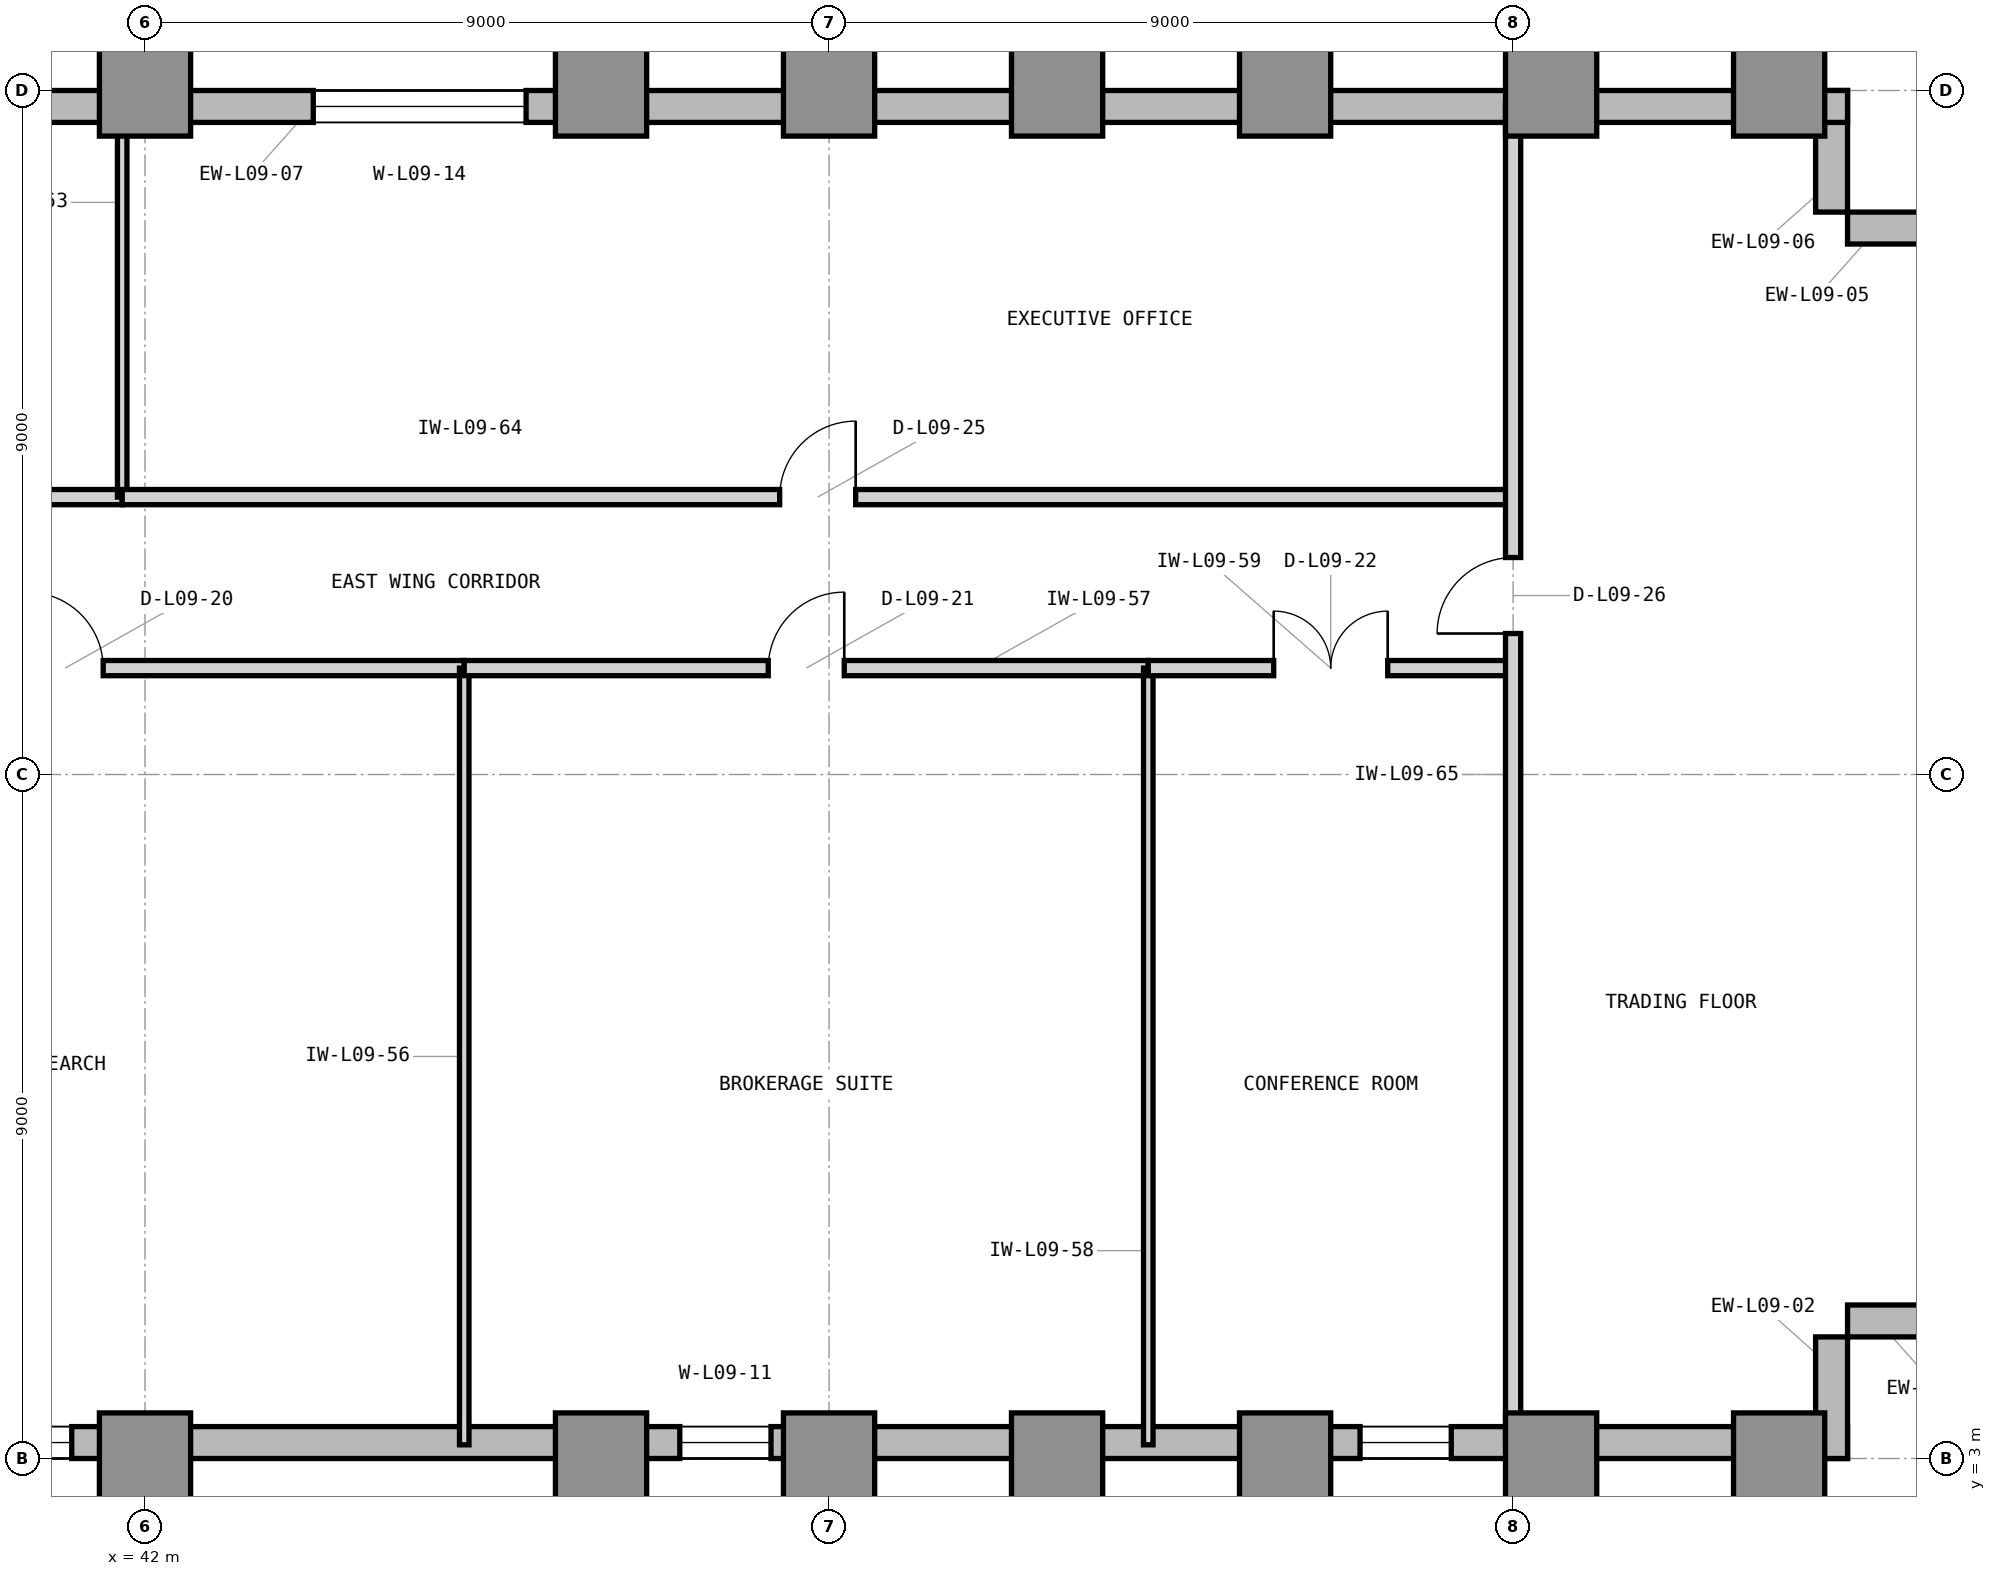
"""IFC4 building model, lengths in metres.
Left out: names, types, materials, properties, quantities, classifications, styles, units other than length and angle.
Written with IfcOpenShell. Run it as: python <this file> out.ifc"""

import sys

from ifc_helpers import new_model, si_unit, direction, frame, frame_2d, origin, origin_2d, place, context, subcontext, project, spatial, rectangle, extrude, element, fill, save


model = new_model("IFC4")
c1 = context("Model", 3, precision=1e-05, world=origin(), true_north=direction((0.0, 1.0)))
c2 = subcontext(c1, "Body", "Model", "MODEL_VIEW")
j1 = project(units=[si_unit("LENGTHUNIT", "METRE"), si_unit("PLANEANGLEUNIT", "RADIAN")], contexts=[c1])
p1 = place(None, origin())
s1 = spatial("IfcSite", under=j1, at=p1, CompositionType="ELEMENT")
p2 = place(p1, origin())
s2 = spatial("IfcBuilding", under=s1, at=p2, CompositionType="ELEMENT")
p3 = place(p2, frame((0.0, 0.0, 42.6)))
s3 = spatial("IfcBuildingStorey", under=s2, at=p3, CompositionType="ELEMENT", Elevation=42.6)
for number, where, z_axis, x_axis in (
    (1, (42.0, 3.0, 0.0), (0.0, 0.0, 1.0), (1.0, 0.0, 0.0)),
    (2, (42.0, 21.0, 0.0), (0.0, 0.0, 1.0), (1.0, 0.0, 0.0)),
    (3, (48.0, 3.0, 0.0), (0.0, 0.0, 1.0), (1.0, 0.0, 0.0)),
    (4, (48.0, 21.0, 0.0), (0.0, 0.0, 1.0), (1.0, 0.0, 0.0)),
    (5, (51.0, 3.0, 0.0), (0.0, 0.0, 1.0), (1.0, 0.0, 0.0)),
    (6, (51.0, 21.0, 0.0), (0.0, 0.0, 1.0), (1.0, 0.0, 0.0)),
    (7, (54.0, 3.0, 0.0), (0.0, 0.0, 1.0), (1.0, 0.0, 0.0)),
    (8, (54.0, 21.0, 0.0), (0.0, 0.0, 1.0), (1.0, 0.0, 0.0)),
    (9, (57.0, 3.0, 0.0), (0.0, 0.0, 1.0), (1.0, 0.0, 0.0)),
    (10, (57.0, 21.0, 0.0), (0.0, 0.0, 1.0), (1.0, 0.0, 0.0)),
    (11, (60.5, 3.0, 0.0), (0.0, 0.0, 1.0), (1.0, 0.0, 0.0)),
    (12, (60.5, 21.0, 0.0), (0.0, 0.0, 1.0), (1.0, 0.0, 0.0)),
    (13, (63.5, 3.0, 0.0), (0.0, 0.0, 1.0), (1.0, 0.0, 0.0)),
    (14, (63.5, 21.0, 0.0), (0.0, 0.0, 1.0), (1.0, 0.0, 0.0)),
):
    element("IfcColumn", number, at=place(p3, frame(where, z_axis=z_axis, x_axis=x_axis)), inside=s3, PredefinedType="COLUMN", context=c2, shape_type="SweptSolid", body=[
        extrude(rectangle(XDim=1.2, YDim=1.2, at=origin_2d()), origin(), (0.0, 0.0, 1.0), 4.2),
    ])
p4 = place(p3, frame((23.9, 3.21, 0.0), z_axis=(0.0, 0.0, 1.0), x_axis=(1.0, 0.0, 0.0)))
e15 = element("IfcWall", 15, at=p4, inside=s3, PredefinedType="STANDARD", context=c2, shape_type="SweptSolid", body=[
    extrude(rectangle(XDim=40.5, YDim=0.42, at=frame_2d((20.25, 0.0))), origin(), (0.0, 0.0, 1.0), 3.98),
])
p5 = place(p4, frame((1.1, 0.0, 0.85)))
e16 = element("IfcOpeningElement", 16, at=p5, cuts=e15, PredefinedType="OPENING", context=c2, shape_type="SweptSolid", body=[
    extrude(rectangle(XDim=1.2, YDim=2.45, at=frame_2d((0.6, 1.225))), frame((0.0, 0.22, 0.0), z_axis=(0.0, -1.0, 0.0), x_axis=(1.0, 0.0, 0.0)), (0.0, 0.0, 1.0), 0.44),
])
p6 = place(p4, frame((5.336, 0.0, 0.85)))
e17 = element("IfcOpeningElement", 17, at=p6, cuts=e15, PredefinedType="OPENING", context=c2, shape_type="SweptSolid", body=[
    extrude(rectangle(XDim=2.8, YDim=2.45, at=frame_2d((1.4, 1.225))), frame((0.0, 0.22, 0.0), z_axis=(0.0, -1.0, 0.0), x_axis=(1.0, 0.0, 0.0)), (0.0, 0.0, 1.0), 0.44),
])
p7 = place(p4, frame((14.336, 0.0, 0.85)))
e18 = element("IfcOpeningElement", 18, at=p7, cuts=e15, PredefinedType="OPENING", context=c2, shape_type="SweptSolid", body=[
    extrude(rectangle(XDim=2.8, YDim=2.45, at=frame_2d((1.4, 1.225))), frame((0.0, 0.22, 0.0), z_axis=(0.0, -1.0, 0.0), x_axis=(1.0, 0.0, 0.0)), (0.0, 0.0, 1.0), 0.44),
])
p8 = place(p4, frame((25.136, 0.0, 0.85)))
e19 = element("IfcOpeningElement", 19, at=p8, cuts=e15, PredefinedType="OPENING", context=c2, shape_type="SweptSolid", body=[
    extrude(rectangle(XDim=1.2, YDim=2.45, at=frame_2d((0.6, 1.225))), frame((0.0, 0.22, 0.0), z_axis=(0.0, -1.0, 0.0), x_axis=(1.0, 0.0, 0.0)), (0.0, 0.0, 1.0), 0.44),
])
p9 = place(p4, frame((34.086, 0.0, 0.85)))
e20 = element("IfcOpeningElement", 20, at=p9, cuts=e15, PredefinedType="OPENING", context=c2, shape_type="SweptSolid", body=[
    extrude(rectangle(XDim=1.2, YDim=2.45, at=frame_2d((0.6, 1.225))), frame((0.0, 0.22, 0.0), z_axis=(0.0, -1.0, 0.0), x_axis=(1.0, 0.0, 0.0)), (0.0, 0.0, 1.0), 0.44),
])
for number, where, z_axis, x_axis in (
    (21, (64.19, 3.0, 0.0), (0.0, 0.0, 1.0), (0.0, 1.0, 0.0)),
    (22, (64.4, 4.81, 0.0), (0.0, 0.0, 1.0), (1.0, 0.0, 0.0)),
    (23, (66.0, 19.19, 0.0), (0.0, 0.0, 1.0), (-1.0, 0.0, 0.0)),
    (24, (64.19, 19.4, 0.0), (0.0, 0.0, 1.0), (0.0, 1.0, 0.0)),
):
    element("IfcWall", number, at=place(p3, frame(where, z_axis=z_axis, x_axis=x_axis)), inside=s3, PredefinedType="STANDARD", context=c2, shape_type="SweptSolid", body=[
        extrude(rectangle(XDim=1.6, YDim=0.42, at=frame_2d((0.8, 0.0))), origin(), (0.0, 0.0, 1.0), 3.98),
    ])
p10 = place(p3, frame((64.4, 20.79, 0.0), z_axis=(0.0, 0.0, 1.0), x_axis=(-1.0, 0.0, 0.0)))
e25 = element("IfcWall", 25, at=p10, inside=s3, PredefinedType="STANDARD", context=c2, shape_type="SweptSolid", body=[
    extrude(rectangle(XDim=40.4, YDim=0.42, at=frame_2d((20.2, 0.0))), origin(), (0.0, 0.0, 1.0), 3.98),
])
p11 = place(p10, frame((26.375, 0.0, 0.85)))
e26 = element("IfcOpeningElement", 26, at=p11, cuts=e25, PredefinedType="OPENING", context=c2, shape_type="SweptSolid", body=[
    extrude(rectangle(XDim=2.8, YDim=2.45, at=frame_2d((1.4, 1.225))), frame((0.0, 0.22, 0.0), z_axis=(0.0, -1.0, 0.0), x_axis=(1.0, 0.0, 0.0)), (0.0, 0.0, 1.0), 0.44),
])
p12 = place(p10, frame((38.222, 0.0, 0.85)))
e27 = element("IfcOpeningElement", 27, at=p12, cuts=e25, PredefinedType="OPENING", context=c2, shape_type="SweptSolid", body=[
    extrude(rectangle(XDim=1.2, YDim=2.45, at=frame_2d((0.6, 1.225))), frame((0.0, 0.22, 0.0), z_axis=(0.0, -1.0, 0.0), x_axis=(1.0, 0.0, 0.0)), (0.0, 0.0, 1.0), 0.44),
])
p13 = place(p10, frame((32.536, 0.0, 0.85)))
e28 = element("IfcOpeningElement", 28, at=p13, cuts=e25, PredefinedType="OPENING", context=c2, shape_type="SweptSolid", body=[
    extrude(rectangle(XDim=2.8, YDim=2.45, at=frame_2d((1.4, 1.225))), frame((0.0, 0.22, 0.0), z_axis=(0.0, -1.0, 0.0), x_axis=(1.0, 0.0, 0.0)), (0.0, 0.0, 1.0), 0.44),
])
p14 = place(p10, frame((17.386, 0.0, 0.85)))
e29 = element("IfcOpeningElement", 29, at=p14, cuts=e25, PredefinedType="OPENING", context=c2, shape_type="SweptSolid", body=[
    extrude(rectangle(XDim=2.8, YDim=2.45, at=frame_2d((1.4, 1.225))), frame((0.0, 0.22, 0.0), z_axis=(0.0, -1.0, 0.0), x_axis=(1.0, 0.0, 0.0)), (0.0, 0.0, 1.0), 0.44),
])
p15 = place(p3, frame((35.7, 13.4, 0.0), z_axis=(0.0, 0.0, 1.0), x_axis=(1.0, 0.0, 0.0)))
e30 = element("IfcWall", 30, at=p15, inside=s3, PredefinedType="PARTITIONING", context=c2, shape_type="SweptSolid", body=[
    extrude(rectangle(XDim=10.5, YDim=0.2, at=frame_2d((5.25, 0.0))), origin(), (0.0, 0.0, 1.0), 3.97),
])
p16 = place(p15, frame((4.75, 0.0, 0.0)))
e31 = element("IfcOpeningElement", 31, at=p16, cuts=e30, PredefinedType="OPENING", context=c2, shape_type="SweptSolid", body=[
    extrude(rectangle(XDim=1.0, YDim=2.15, at=frame_2d((0.5, 1.075))), frame((0.0, 0.11, 0.0), z_axis=(0.0, -1.0, 0.0), x_axis=(1.0, 0.0, 0.0)), (0.0, 0.0, 1.0), 0.22),
])
p17 = place(p3, frame((46.2, 3.18, 0.0), z_axis=(0.0, 0.0, 1.0), x_axis=(0.0, 1.0, 0.0)))
e32 = element("IfcWall", 32, at=p17, inside=s3, PredefinedType="PARTITIONING", context=c2, shape_type="SweptSolid", body=[
    extrude(rectangle(XDim=10.22, YDim=0.125, at=frame_2d((5.11, 0.0))), origin(), (0.0, 0.0, 1.0), 3.97),
])
p18 = place(p3, frame((46.2, 13.4, 0.0), z_axis=(0.0, 0.0, 1.0), x_axis=(1.0, 0.0, 0.0)))
e33 = element("IfcWall", 33, at=p18, inside=s3, PredefinedType="PARTITIONING", context=c2, shape_type="SweptSolid", body=[
    extrude(rectangle(XDim=9.0, YDim=0.2, at=frame_2d((4.5, 0.0))), origin(), (0.0, 0.0, 1.0), 3.97),
])
p19 = place(p18, frame((4.0, 0.0, 0.0)))
e34 = element("IfcOpeningElement", 34, at=p19, cuts=e33, PredefinedType="OPENING", context=c2, shape_type="SweptSolid", body=[
    extrude(rectangle(XDim=1.0, YDim=2.15, at=frame_2d((0.5, 1.075))), frame((0.0, 0.11, 0.0), z_axis=(0.0, -1.0, 0.0), x_axis=(1.0, 0.0, 0.0)), (0.0, 0.0, 1.0), 0.22),
])
p20 = place(p3, frame((55.2, 3.18, 0.0), z_axis=(0.0, 0.0, 1.0), x_axis=(0.0, 1.0, 0.0)))
e35 = element("IfcWall", 35, at=p20, inside=s3, PredefinedType="PARTITIONING", context=c2, shape_type="SweptSolid", body=[
    extrude(rectangle(XDim=10.22, YDim=0.125, at=frame_2d((5.11, 0.0))), origin(), (0.0, 0.0, 1.0), 3.97),
])
p21 = place(p3, frame((55.2, 13.4, 0.0), z_axis=(0.0, 0.0, 1.0), x_axis=(1.0, 0.0, 0.0)))
e36 = element("IfcWall", 36, at=p21, inside=s3, PredefinedType="PARTITIONING", context=c2, shape_type="SweptSolid", body=[
    extrude(rectangle(XDim=4.8, YDim=0.2, at=frame_2d((2.4, 0.0))), origin(), (0.0, 0.0, 1.0), 3.97),
])
p22 = place(p21, frame((1.65, 0.0, 0.0)))
e37 = element("IfcOpeningElement", 37, at=p22, cuts=e36, PredefinedType="OPENING", context=c2, shape_type="SweptSolid", body=[
    extrude(rectangle(XDim=1.5, YDim=2.3, at=frame_2d((0.75, 1.15))), frame((0.0, 0.11, 0.0), z_axis=(0.0, -1.0, 0.0), x_axis=(1.0, 0.0, 0.0)), (0.0, 0.0, 1.0), 0.22),
])
p23 = place(p3, frame((34.2, 15.65, 0.0), z_axis=(0.0, 0.0, 1.0), x_axis=(1.0, 0.0, 0.0)))
e38 = element("IfcWall", 38, at=p23, inside=s3, PredefinedType="PARTITIONING", context=c2, shape_type="SweptSolid", body=[
    extrude(rectangle(XDim=7.5, YDim=0.2, at=frame_2d((3.75, 0.0))), origin(), (0.0, 0.0, 1.0), 3.97),
])
p24 = place(p23, frame((3.0, 0.0, 0.0)))
e39 = element("IfcOpeningElement", 39, at=p24, cuts=e38, PredefinedType="OPENING", context=c2, shape_type="SweptSolid", body=[
    extrude(rectangle(XDim=1.5, YDim=2.3, at=frame_2d((0.75, 1.15))), frame((0.0, 0.11, 0.0), z_axis=(0.0, -1.0, 0.0), x_axis=(1.0, 0.0, 0.0)), (0.0, 0.0, 1.0), 0.22),
])
p25 = place(p3, frame((41.7, 15.65, 0.0), z_axis=(0.0, 0.0, 1.0), x_axis=(0.0, 1.0, 0.0)))
e40 = element("IfcWall", 40, at=p25, inside=s3, PredefinedType="PARTITIONING", context=c2, shape_type="SweptSolid", body=[
    extrude(rectangle(XDim=5.17, YDim=0.125, at=frame_2d((2.585, 0.0))), origin(), (0.0, 0.0, 1.0), 3.97),
])
p26 = place(p3, frame((41.7, 15.65, 0.0), z_axis=(0.0, 0.0, 1.0), x_axis=(1.0, 0.0, 0.0)))
e41 = element("IfcWall", 41, at=p26, inside=s3, PredefinedType="PARTITIONING", context=c2, shape_type="SweptSolid", body=[
    extrude(rectangle(XDim=18.3, YDim=0.2, at=frame_2d((9.15, 0.0))), origin(), (0.0, 0.0, 1.0), 3.97),
])
p27 = place(p26, frame((8.65, 0.0, 0.0)))
e42 = element("IfcOpeningElement", 42, at=p27, cuts=e41, PredefinedType="OPENING", context=c2, shape_type="SweptSolid", body=[
    extrude(rectangle(XDim=1.0, YDim=2.15, at=frame_2d((0.5, 1.075))), frame((0.0, 0.11, 0.0), z_axis=(0.0, -1.0, 0.0), x_axis=(1.0, 0.0, 0.0)), (0.0, 0.0, 1.0), 0.22),
])
p28 = place(p3, frame((60.0, 3.18, 0.0), z_axis=(0.0, 0.0, 1.0), x_axis=(0.0, 1.0, 0.0)))
e43 = element("IfcWall", 43, at=p28, inside=s3, PredefinedType="PARTITIONING", context=c2, shape_type="SweptSolid", body=[
    extrude(rectangle(XDim=17.64, YDim=0.2, at=frame_2d((8.82, 0.0))), origin(), (0.0, 0.0, 1.0), 3.97),
])
p29 = place(p28, frame((10.675, 0.0, 0.0)))
e44 = element("IfcOpeningElement", 44, at=p29, cuts=e43, PredefinedType="OPENING", context=c2, shape_type="SweptSolid", body=[
    extrude(rectangle(XDim=1.0, YDim=2.15, at=frame_2d((0.5, 1.075))), frame((0.0, 0.11, 0.0), z_axis=(0.0, -1.0, 0.0), x_axis=(1.0, 0.0, 0.0)), (0.0, 0.0, 1.0), 0.22),
])
p30 = place(p16, origin())
e45 = element("IfcDoor", 45, at=p30, inside=s3, OperationType="SINGLE_SWING_LEFT", PredefinedType="DOOR", context=c2, shape_type="SweptSolid", body=[
    extrude(rectangle(XDim=1.0, YDim=2.15, at=frame_2d((0.5, 1.075))), frame((0.0, 0.025, 0.0), z_axis=(0.0, -1.0, 0.0), x_axis=(1.0, 0.0, 0.0)), (0.0, 0.0, 1.0), 0.05),
])
fill(e31, e45)
p31 = place(p19, origin())
e46 = element("IfcDoor", 46, at=p31, inside=s3, OperationType="SINGLE_SWING_RIGHT", PredefinedType="DOOR", context=c2, shape_type="SweptSolid", body=[
    extrude(rectangle(XDim=1.0, YDim=2.15, at=frame_2d((0.5, 1.075))), frame((0.0, 0.025, 0.0), z_axis=(0.0, -1.0, 0.0), x_axis=(1.0, 0.0, 0.0)), (0.0, 0.0, 1.0), 0.05),
])
fill(e34, e46)
p32 = place(p22, origin())
e47 = element("IfcDoor", 47, at=p32, inside=s3, OperationType="DOUBLE_DOOR_SINGLE_SWING", PredefinedType="DOOR", context=c2, shape_type="SweptSolid", body=[
    extrude(rectangle(XDim=1.5, YDim=2.3, at=frame_2d((0.75, 1.15))), frame((0.0, 0.025, 0.0), z_axis=(0.0, -1.0, 0.0), x_axis=(1.0, 0.0, 0.0)), (0.0, 0.0, 1.0), 0.05),
])
fill(e37, e47)
p33 = place(p27, origin())
e48 = element("IfcDoor", 48, at=p33, inside=s3, OperationType="SINGLE_SWING_RIGHT", PredefinedType="DOOR", context=c2, shape_type="SweptSolid", body=[
    extrude(rectangle(XDim=1.0, YDim=2.15, at=frame_2d((0.5, 1.075))), frame((0.0, 0.025, 0.0), z_axis=(0.0, -1.0, 0.0), x_axis=(1.0, 0.0, 0.0)), (0.0, 0.0, 1.0), 0.05),
])
fill(e42, e48)
p34 = place(p29, origin())
e49 = element("IfcDoor", 49, at=p34, inside=s3, OperationType="SINGLE_SWING_LEFT", PredefinedType="DOOR", context=c2, shape_type="SweptSolid", body=[
    extrude(rectangle(XDim=1.0, YDim=2.15, at=frame_2d((0.5, 1.075))), frame((0.0, 0.025, 0.0), z_axis=(0.0, -1.0, 0.0), x_axis=(1.0, 0.0, 0.0)), (0.0, 0.0, 1.0), 0.05),
])
fill(e44, e49)
p35 = place(p7, origin())
e50 = element("IfcWindow", 50, at=p35, inside=s3, PartitioningType="SINGLE_PANEL", PredefinedType="WINDOW", context=c2, shape_type="SweptSolid", body=[
    extrude(rectangle(XDim=2.8, YDim=2.45, at=frame_2d((1.4, 1.225))), frame((0.0, 0.11, 0.0), z_axis=(0.0, -1.0, 0.0), x_axis=(1.0, 0.0, 0.0)), (0.0, 0.0, 1.0), 0.06),
])
fill(e18, e50)
p36 = place(p8, origin())
e51 = element("IfcWindow", 51, at=p36, inside=s3, PartitioningType="SINGLE_PANEL", PredefinedType="WINDOW", context=c2, shape_type="SweptSolid", body=[
    extrude(rectangle(XDim=1.2, YDim=2.45, at=frame_2d((0.6, 1.225))), frame((0.0, 0.11, 0.0), z_axis=(0.0, -1.0, 0.0), x_axis=(1.0, 0.0, 0.0)), (0.0, 0.0, 1.0), 0.06),
])
fill(e19, e51)
p37 = place(p9, origin())
e52 = element("IfcWindow", 52, at=p37, inside=s3, PartitioningType="SINGLE_PANEL", PredefinedType="WINDOW", context=c2, shape_type="SweptSolid", body=[
    extrude(rectangle(XDim=1.2, YDim=2.45, at=frame_2d((0.6, 1.225))), frame((0.0, 0.11, 0.0), z_axis=(0.0, -1.0, 0.0), x_axis=(1.0, 0.0, 0.0)), (0.0, 0.0, 1.0), 0.06),
])
fill(e20, e52)
p38 = place(p14, origin())
e53 = element("IfcWindow", 53, at=p38, inside=s3, PartitioningType="SINGLE_PANEL", PredefinedType="WINDOW", context=c2, shape_type="SweptSolid", body=[
    extrude(rectangle(XDim=2.8, YDim=2.45, at=frame_2d((1.4, 1.225))), frame((0.0, 0.11, 0.0), z_axis=(0.0, -1.0, 0.0), x_axis=(1.0, 0.0, 0.0)), (0.0, 0.0, 1.0), 0.06),
])
fill(e29, e53)
save(model, sys.argv[1])
